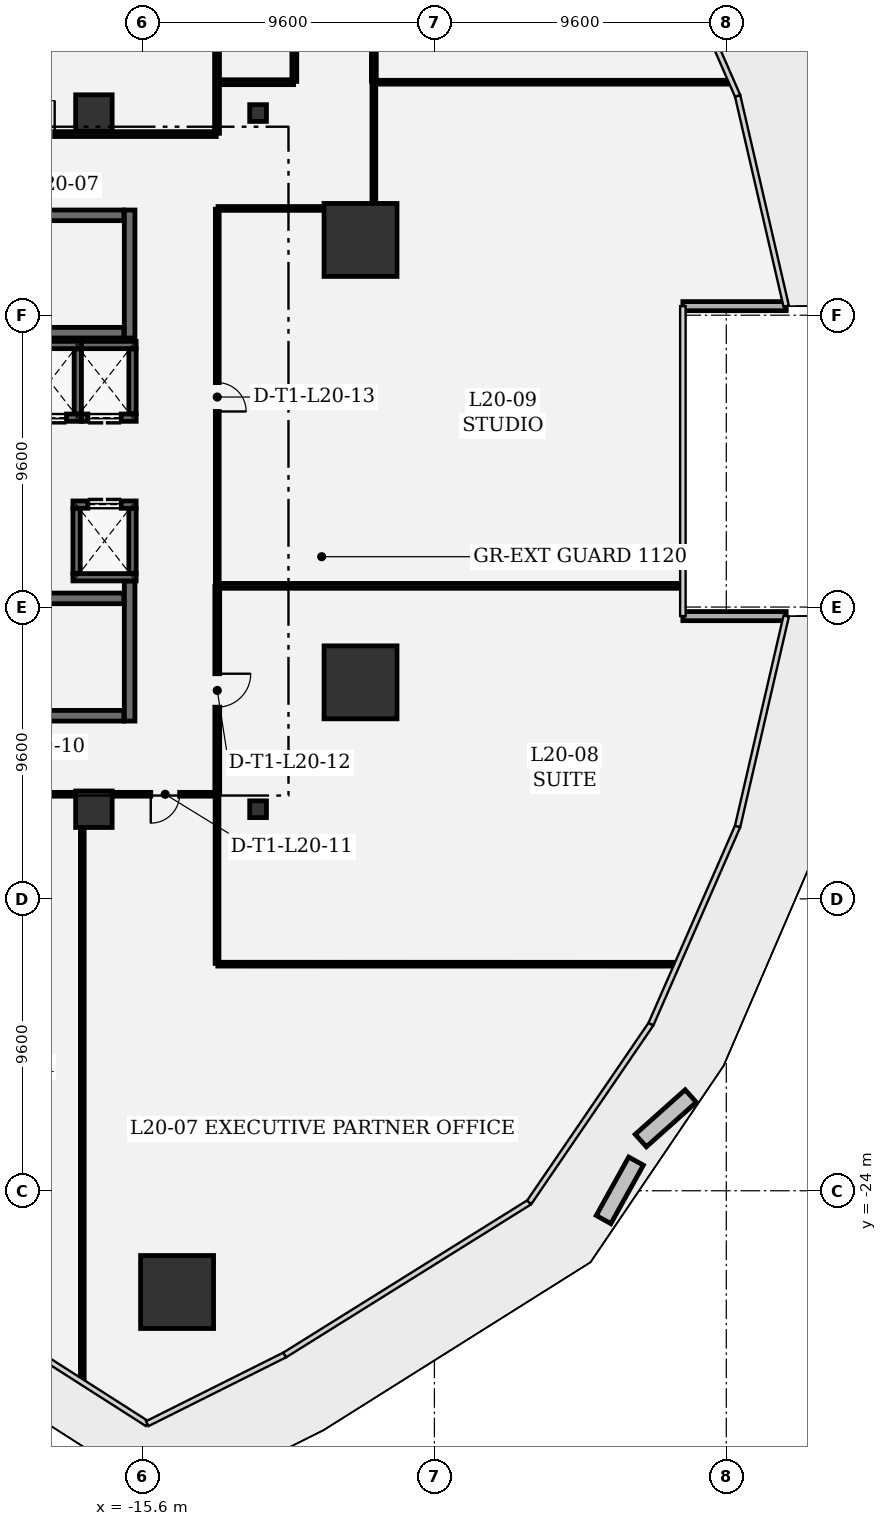
"""IFC4 building model, lengths in metres.
Left out: names, types, materials, properties, quantities, classifications, styles, units other than length and angle.
Written with IfcOpenShell. Run it as: python <this file> out.ifc"""

import sys

from ifc_helpers import new_model, si_unit, direction, frame, frame_2d, origin, origin_2d, place, context, subcontext, project, spatial, rectangle, extrude, element, fill, save


model = new_model("IFC4")
c1 = context("Model", 3, precision=1e-05, world=origin(), true_north=direction((0.0, 1.0)))
c2 = subcontext(c1, "Body", "Model", "MODEL_VIEW")
j1 = project(units=[si_unit("LENGTHUNIT", "METRE"), si_unit("PLANEANGLEUNIT", "RADIAN")], contexts=[c1])
p1 = place(None, origin())
s1 = spatial("IfcSite", under=j1, at=p1, CompositionType="ELEMENT")
p2 = place(p1, origin())
s2 = spatial("IfcBuilding", under=s1, at=p2, CompositionType="ELEMENT")
p3 = place(p2, frame((0.0, 0.0, 91.2)))
s3 = spatial("IfcBuildingStorey", under=s2, at=p3, CompositionType="ELEMENT", Elevation=91.2)
for number, where, z_axis, x_axis in (
    (1, (-14.464, -27.331, 0.0), (0.0, 0.0, 1.0), (1.0, 0.0, 0.0)),
    (2, (-8.43, -7.276, 0.0), (0.0, 0.0, 1.0), (1.0, 0.0, 0.0)),
    (3, (-8.43, 7.276, 0.0), (0.0, 0.0, 1.0), (1.0, 0.0, 0.0)),
):
    element("IfcColumn", number, at=place(p3, frame(where, z_axis=z_axis, x_axis=x_axis)), inside=s3, PredefinedType="COLUMN", context=c2, shape_type="SweptSolid", body=[
        extrude(rectangle(XDim=2.4, YDim=2.4, at=origin_2d()), origin(), (0.0, 0.0, 1.0), 4.2),
    ])
for number, where, z_axis, x_axis in (
    (4, (-17.2, 11.45, 0.0), (0.0, 0.0, 1.0), (1.0, 0.0, 0.0)),
    (5, (-17.2, -11.45, 0.0), (0.0, 0.0, 1.0), (1.0, 0.0, 0.0)),
):
    element("IfcColumn", number, at=place(p3, frame(where, z_axis=z_axis, x_axis=x_axis)), inside=s3, PredefinedType="COLUMN", context=c2, shape_type="SweptSolid", body=[
        extrude(rectangle(XDim=1.2, YDim=1.2, at=origin_2d()), origin(), (0.0, 0.0, 1.0), 4.2),
    ])
for number, where, z_axis, x_axis in (
    (6, (-11.8, -11.45, 0.0), (0.0, 0.0, 1.0), (1.0, 0.0, 0.0)),
    (7, (-11.8, 11.45, 0.0), (0.0, 0.0, 1.0), (1.0, 0.0, 0.0)),
):
    element("IfcColumn", number, at=place(p3, frame(where, z_axis=z_axis, x_axis=x_axis)), inside=s3, PredefinedType="COLUMN", context=c2, shape_type="SweptSolid", body=[
        extrude(rectangle(XDim=0.55, YDim=0.55, at=origin_2d()), origin(), (0.0, 0.0, 1.0), 4.2),
    ])
for number, where, z_axis, x_axis in (
    (8, (5.571, -5.098, 0.0), (0.0, 0.0, 1.0), (-1.0, 0.0, 0.0)),
    (9, (2.172, 5.098, 0.0), (0.0, 0.0, 1.0), (1.0, 0.0, 0.0)),
):
    element("IfcWall", number, at=place(p3, frame(where, z_axis=z_axis, x_axis=x_axis)), inside=s3, PredefinedType="SOLIDWALL", context=c2, shape_type="SweptSolid", body=[
        extrude(rectangle(XDim=3.398, YDim=0.3, at=frame_2d((1.699, 0.0))), origin(), (0.0, 0.0, 1.0), 3.92),
    ])
p4 = place(p3, frame((-16.025, 4.05, 0.0), z_axis=(0.0, 0.0, 1.0), x_axis=(0.0, 1.0, 0.0)))
e10 = element("IfcWall", 10, at=p4, inside=s3, PredefinedType="SHEAR", context=c2, shape_type="SweptSolid", body=[
    extrude(rectangle(XDim=4.21, YDim=0.35, at=frame_2d((2.105, 0.0))), origin(), (0.0, 0.0, 1.0), 3.92),
])
p5 = place(p3, frame((-24.335, 4.225, 0.0), z_axis=(0.0, 0.0, 1.0), x_axis=(1.0, 0.0, 0.0)))
e11 = element("IfcWall", 11, at=p5, inside=s3, PredefinedType="SHEAR", context=c2, shape_type="SweptSolid", body=[
    extrude(rectangle(XDim=8.12, YDim=0.35, at=frame_2d((4.06, 0.0))), origin(), (0.0, 0.0, 1.0), 3.92),
])
p6 = place(p3, frame((-16.215, 8.085, 0.0), z_axis=(0.0, 0.0, 1.0), x_axis=(-1.0, 0.0, 0.0)))
e12 = element("IfcWall", 12, at=p6, inside=s3, PredefinedType="SHEAR", context=c2, shape_type="SweptSolid", body=[
    extrude(rectangle(XDim=8.12, YDim=0.35, at=frame_2d((4.06, 0.0))), origin(), (0.0, 0.0, 1.0), 3.92),
])
p7 = place(p6, frame((6.74, 0.0, 0.0)))
e13 = element("IfcOpeningElement", 13, at=p7, cuts=e12, PredefinedType="OPENING", context=c2, shape_type="SweptSolid", body=[
    extrude(rectangle(XDim=1.1, YDim=2.2, at=frame_2d((0.55, 1.1))), frame((0.0, 0.185, 0.0), z_axis=(0.0, -1.0, 0.0), x_axis=(1.0, 0.0, 0.0)), (0.0, 0.0, 1.0), 0.37),
])
p8 = place(p3, frame((-16.025, -8.55, 0.0), z_axis=(0.0, 0.0, 1.0), x_axis=(0.0, 1.0, 0.0)))
e14 = element("IfcWall", 14, at=p8, inside=s3, PredefinedType="SHEAR", context=c2, shape_type="SweptSolid", body=[
    extrude(rectangle(XDim=4.61, YDim=0.35, at=frame_2d((2.305, 0.0))), origin(), (0.0, 0.0, 1.0), 3.92),
])
p9 = place(p3, frame((-24.335, -8.375, 0.0), z_axis=(0.0, 0.0, 1.0), x_axis=(1.0, 0.0, 0.0)))
e15 = element("IfcWall", 15, at=p9, inside=s3, PredefinedType="SHEAR", context=c2, shape_type="SweptSolid", body=[
    extrude(rectangle(XDim=8.12, YDim=0.35, at=frame_2d((4.06, 0.0))), origin(), (0.0, 0.0, 1.0), 3.92),
])
p10 = place(p9, frame((0.28, 0.0, 0.0)))
e16 = element("IfcOpeningElement", 16, at=p10, cuts=e15, PredefinedType="OPENING", context=c2, shape_type="SweptSolid", body=[
    extrude(rectangle(XDim=1.1, YDim=2.2, at=frame_2d((0.55, 1.1))), frame((0.0, 0.185, 0.0), z_axis=(0.0, -1.0, 0.0), x_axis=(1.0, 0.0, 0.0)), (0.0, 0.0, 1.0), 0.37),
])
p11 = place(p3, frame((-16.215, -4.515, 0.0), z_axis=(0.0, 0.0, 1.0), x_axis=(-1.0, 0.0, 0.0)))
e17 = element("IfcWall", 17, at=p11, inside=s3, PredefinedType="SHEAR", context=c2, shape_type="SweptSolid", body=[
    extrude(rectangle(XDim=8.12, YDim=0.35, at=frame_2d((4.06, 0.0))), origin(), (0.0, 0.0, 1.0), 3.92),
])
p12 = place(p3, frame((-17.61, 1.43, 0.0), z_axis=(0.0, 0.0, 1.0), x_axis=(-1.0, 0.0, 0.0)))
e18 = element("IfcWall", 18, at=p12, inside=s3, PredefinedType="SHEAR", context=c2, shape_type="SweptSolid", body=[
    extrude(rectangle(XDim=2.08, YDim=0.24, at=frame_2d((1.04, 0.0))), origin(), (0.0, 0.0, 1.0), 3.92),
])
p13 = place(p12, frame((0.49, 0.0, 0.0)))
e19 = element("IfcOpeningElement", 19, at=p13, cuts=e18, PredefinedType="OPENING", context=c2, shape_type="SweptSolid", body=[
    extrude(rectangle(XDim=1.1, YDim=2.2, at=frame_2d((0.55, 1.1))), frame((0.0, 0.13, 0.0), z_axis=(0.0, -1.0, 0.0), x_axis=(1.0, 0.0, 0.0)), (0.0, 0.0, 1.0), 0.26),
])
p14 = place(p3, frame((-19.69, 3.82, 0.0), z_axis=(0.0, 0.0, 1.0), x_axis=(1.0, 0.0, 0.0)))
e20 = element("IfcWall", 20, at=p14, inside=s3, PredefinedType="SHEAR", context=c2, shape_type="SweptSolid", body=[
    extrude(rectangle(XDim=2.08, YDim=0.24, at=frame_2d((1.04, 0.0))), origin(), (0.0, 0.0, 1.0), 3.92),
])
p15 = place(p3, frame((-17.73, 3.688, 0.0), z_axis=(0.0, 0.0, 1.0), x_axis=(0.0, -1.0, 0.0)))
e21 = element("IfcWall", 21, at=p15, inside=s3, PredefinedType="SHEAR", context=c2, shape_type="SweptSolid", body=[
    extrude(rectangle(XDim=2.126, YDim=0.24, at=frame_2d((1.063, 0.0))), origin(), (0.0, 0.0, 1.0), 3.92),
])
p16 = place(p3, frame((-15.81, 1.43, 0.0), z_axis=(0.0, 0.0, 1.0), x_axis=(-1.0, 0.0, 0.0)))
e22 = element("IfcWall", 22, at=p16, inside=s3, PredefinedType="SHEAR", context=c2, shape_type="SweptSolid", body=[
    extrude(rectangle(XDim=1.8, YDim=0.24, at=frame_2d((0.9, 0.0))), origin(), (0.0, 0.0, 1.0), 3.92),
])
p17 = place(p16, frame((0.49, 0.0, 0.0)))
e23 = element("IfcOpeningElement", 23, at=p17, cuts=e22, PredefinedType="OPENING", context=c2, shape_type="SweptSolid", body=[
    extrude(rectangle(XDim=1.1, YDim=2.2, at=frame_2d((0.55, 1.1))), frame((0.0, 0.13, 0.0), z_axis=(0.0, -1.0, 0.0), x_axis=(1.0, 0.0, 0.0)), (0.0, 0.0, 1.0), 0.26),
])
p18 = place(p3, frame((-17.61, 3.82, 0.0), z_axis=(0.0, 0.0, 1.0), x_axis=(1.0, 0.0, 0.0)))
e24 = element("IfcWall", 24, at=p18, inside=s3, PredefinedType="SHEAR", context=c2, shape_type="SweptSolid", body=[
    extrude(rectangle(XDim=1.8, YDim=0.24, at=frame_2d((0.9, 0.0))), origin(), (0.0, 0.0, 1.0), 3.92),
])
p19 = place(p3, frame((-15.93, 3.688, 0.0), z_axis=(0.0, 0.0, 1.0), x_axis=(0.0, -1.0, 0.0)))
e25 = element("IfcWall", 25, at=p19, inside=s3, PredefinedType="SHEAR", context=c2, shape_type="SweptSolid", body=[
    extrude(rectangle(XDim=2.126, YDim=0.24, at=frame_2d((1.063, 0.0))), origin(), (0.0, 0.0, 1.0), 3.92),
])
p20 = place(p3, frame((-15.81, -3.82, 0.0), z_axis=(0.0, 0.0, 1.0), x_axis=(-1.0, 0.0, 0.0)))
e26 = element("IfcWall", 26, at=p20, inside=s3, PredefinedType="SHEAR", context=c2, shape_type="SweptSolid", body=[
    extrude(rectangle(XDim=2.08, YDim=0.24, at=frame_2d((1.04, 0.0))), origin(), (0.0, 0.0, 1.0), 3.92),
])
p21 = place(p3, frame((-17.89, -1.43, 0.0), z_axis=(0.0, 0.0, 1.0), x_axis=(1.0, 0.0, 0.0)))
e27 = element("IfcWall", 27, at=p21, inside=s3, PredefinedType="SHEAR", context=c2, shape_type="SweptSolid", body=[
    extrude(rectangle(XDim=2.08, YDim=0.24, at=frame_2d((1.04, 0.0))), origin(), (0.0, 0.0, 1.0), 3.92),
])
p22 = place(p21, frame((0.49, 0.0, 0.0)))
e28 = element("IfcOpeningElement", 28, at=p22, cuts=e27, PredefinedType="OPENING", context=c2, shape_type="SweptSolid", body=[
    extrude(rectangle(XDim=1.1, YDim=2.2, at=frame_2d((0.55, 1.1))), frame((0.0, 0.13, 0.0), z_axis=(0.0, -1.0, 0.0), x_axis=(1.0, 0.0, 0.0)), (0.0, 0.0, 1.0), 0.26),
])
for number, where, z_axis, x_axis in (
    (29, (-17.77, -3.688, 0.0), (0.0, 0.0, 1.0), (0.0, 1.0, 0.0)),
    (30, (-15.93, -1.562, 0.0), (0.0, 0.0, 1.0), (0.0, -1.0, 0.0)),
):
    element("IfcWall", number, at=place(p3, frame(where, z_axis=z_axis, x_axis=x_axis)), inside=s3, PredefinedType="SHEAR", context=c2, shape_type="SweptSolid", body=[
        extrude(rectangle(XDim=2.126, YDim=0.24, at=frame_2d((1.063, 0.0))), origin(), (0.0, 0.0, 1.0), 3.92),
    ])
p23 = place(p3, frame((-21.717, 10.758, 0.0), z_axis=(0.0, 0.0, 1.0), x_axis=(1.0, 0.0, 0.0)))
e31 = element("IfcWall", 31, at=p23, inside=s3, PredefinedType="PARTITIONING", context=c2, shape_type="SweptSolid", body=[
    extrude(rectangle(XDim=8.542, YDim=0.16, at=frame_2d((4.271, 0.0))), origin(), (0.0, 0.0, 1.0), 2.957),
])
p24 = place(p23, frame((2.126, 0.0, 0.0)))
e32 = element("IfcOpeningElement", 32, at=p24, cuts=e31, PredefinedType="OPENING", context=c2, shape_type="SweptSolid", body=[
    extrude(rectangle(XDim=1.1, YDim=2.15, at=frame_2d((0.55, 1.075))), frame((0.0, 0.09, 0.0), z_axis=(0.0, -1.0, 0.0), x_axis=(1.0, 0.0, 0.0)), (0.0, 0.0, 1.0), 0.18),
])
p25 = place(p3, frame((-13.15, 10.783, 0.0), z_axis=(0.0, 0.0, 1.0), x_axis=(0.0, 1.0, 0.0)))
e33 = element("IfcWall", 33, at=p25, inside=s3, PredefinedType="PARTITIONING", context=c2, shape_type="SweptSolid", body=[
    extrude(rectangle(XDim=19.651, YDim=0.16, at=frame_2d((9.826, 0.0))), origin(), (0.0, 0.0, 1.0), 2.89),
])
p26 = place(p3, frame((-17.865, -10.958, 0.0), z_axis=(0.0, 0.0, 1.0), x_axis=(-1.0, 0.0, 0.0)))
e34 = element("IfcWall", 34, at=p26, inside=s3, PredefinedType="PARTITIONING", context=c2, shape_type="SweptSolid", body=[
    extrude(rectangle(XDim=4.543, YDim=0.125, at=frame_2d((2.271, 0.0))), origin(), (0.0, 0.0, 1.0), 3.92),
])
p27 = place(p26, frame((1.797, 0.0, 0.0)))
e35 = element("IfcOpeningElement", 35, at=p27, cuts=e34, PredefinedType="OPENING", context=c2, shape_type="SweptSolid", body=[
    extrude(rectangle(XDim=0.95, YDim=2.15, at=frame_2d((0.475, 1.075))), frame((0.0, 0.073, 0.0), z_axis=(0.0, -1.0, 0.0), x_axis=(1.0, 0.0, 0.0)), (0.0, 0.0, 1.0), 0.145),
])
p28 = place(p3, frame((-17.582, -30.217, 0.0), z_axis=(0.0, 0.0, 1.0), x_axis=(0.0, 1.0, 0.0)))
e36 = element("IfcWall", 36, at=p28, inside=s3, PredefinedType="PARTITIONING", context=c2, shape_type="SweptSolid", body=[
    extrude(rectangle(XDim=18.102, YDim=0.125, at=frame_2d((9.051, 0.0))), origin(), (0.0, 0.0, 1.0), 2.957),
])
p29 = place(p3, frame((1.906, -16.549, 0.0), z_axis=(0.0, 0.0, 1.0), x_axis=(-0.999999993536, 0.000113697272, 0.0)))
e37 = element("IfcWall", 37, at=p29, inside=s3, PredefinedType="PARTITIONING", context=c2, shape_type="SweptSolid", body=[
    extrude(rectangle(XDim=15.031, YDim=0.125, at=frame_2d((7.516, 0.0))), origin(), (0.0, 0.0, 1.0), 3.92),
])
p30 = place(p3, frame((-13.15, -10.983, 0.0), z_axis=(0.0, 0.0, 1.0), x_axis=(0.0, -1.0, 0.0)))
e38 = element("IfcWall", 38, at=p30, inside=s3, PredefinedType="PARTITIONING", context=c2, shape_type="SweptSolid", body=[
    extrude(rectangle(XDim=5.539, YDim=0.125, at=frame_2d((2.77, 0.0))), origin(), (0.0, 0.0, 1.0), 3.92),
])
p31 = place(p3, frame((-13.175, -10.958, 0.0), z_axis=(0.0, 0.0, 1.0), x_axis=(-1.0, 0.0, 0.0)))
e39 = element("IfcWall", 39, at=p31, inside=s3, PredefinedType="PARTITIONING", context=c2, shape_type="SweptSolid", body=[
    extrude(rectangle(XDim=3.36, YDim=0.125, at=frame_2d((1.68, 0.0))), origin(), (0.0, 0.0, 1.0), 2.957),
])
p32 = place(p31, frame((1.205, 0.0, 0.0)))
e40 = element("IfcOpeningElement", 40, at=p32, cuts=e39, PredefinedType="OPENING", context=c2, shape_type="SweptSolid", body=[
    extrude(rectangle(XDim=0.95, YDim=2.15, at=frame_2d((0.475, 1.075))), frame((0.0, 0.073, 0.0), z_axis=(0.0, -1.0, 0.0), x_axis=(1.0, 0.0, 0.0)), (0.0, 0.0, 1.0), 0.145),
])
p33 = place(p3, frame((2.092, -4.103, 0.0), z_axis=(0.0, 0.0, 1.0), x_axis=(-1.0, 0.0, 0.0)))
e41 = element("IfcWall", 41, at=p33, inside=s3, PredefinedType="PARTITIONING", context=c2, shape_type="SweptSolid", body=[
    extrude(rectangle(XDim=15.209, YDim=0.16, at=frame_2d((7.605, 0.0))), origin(), (0.0, 0.0, 1.0), 3.92),
])
p34 = place(p3, frame((-13.142, -4.128, 0.0), z_axis=(0.0, 0.0, 1.0), x_axis=(0.0, -1.0, 0.0)))
e42 = element("IfcWall", 42, at=p34, inside=s3, PredefinedType="PARTITIONING", context=c2, shape_type="SweptSolid", body=[
    extrude(rectangle(XDim=6.83, YDim=0.16, at=frame_2d((3.415, 0.0))), origin(), (0.0, 0.0, 1.0), 3.92),
])
p35 = place(p34, frame((2.865, 0.0, 0.0)))
e43 = element("IfcOpeningElement", 43, at=p35, cuts=e42, PredefinedType="OPENING", context=c2, shape_type="SweptSolid", body=[
    extrude(rectangle(XDim=1.1, YDim=2.15, at=frame_2d((0.55, 1.075))), frame((0.0, 0.09, 0.0), z_axis=(0.0, -1.0, 0.0), x_axis=(1.0, 0.0, 0.0)), (0.0, 0.0, 1.0), 0.18),
])
p36 = place(p3, frame((3.696, 12.464, 0.0), z_axis=(0.0, 0.0, 1.0), x_axis=(-1.0, 0.0, 0.0)))
e44 = element("IfcWall", 44, at=p36, inside=s3, PredefinedType="PARTITIONING", context=c2, shape_type="SweptSolid", body=[
    extrude(rectangle(XDim=11.663, YDim=0.125, at=frame_2d((5.832, 0.0))), origin(), (0.0, 0.0, 1.0), 3.92),
])
p37 = place(p3, frame((-7.992, 12.439, 0.0), z_axis=(0.0, 0.0, 1.0), x_axis=(0.0, -1.0, 0.0)))
e45 = element("IfcWall", 45, at=p37, inside=s3, PredefinedType="PARTITIONING", context=c2, shape_type="SweptSolid", body=[
    extrude(rectangle(XDim=3.898, YDim=0.125, at=frame_2d((1.949, 0.0))), origin(), (0.0, 0.0, 1.0), 3.92),
])
p38 = place(p3, frame((-9.695, 8.312, 0.0), z_axis=(0.0, 0.0, 1.0), x_axis=(-1.0, 0.0, 0.0)))
e46 = element("IfcWall", 46, at=p38, inside=s3, PredefinedType="PARTITIONING", context=c2, shape_type="SweptSolid", body=[
    extrude(rectangle(XDim=3.422, YDim=0.125, at=frame_2d((1.711, 0.0))), origin(), (0.0, 0.0, 1.0), 2.957),
])
p39 = place(p3, frame((-13.142, 8.287, 0.0), z_axis=(0.0, 0.0, 1.0), x_axis=(0.0, -1.0, 0.0)))
e47 = element("IfcWall", 47, at=p39, inside=s3, PredefinedType="PARTITIONING", context=c2, shape_type="SweptSolid", body=[
    extrude(rectangle(XDim=12.357, YDim=0.125, at=frame_2d((6.179, 0.0))), origin(), (0.0, 0.0, 1.0), 3.92),
])
p40 = place(p39, frame((5.704, 0.0, 0.0)))
e48 = element("IfcOpeningElement", 48, at=p40, cuts=e47, PredefinedType="OPENING", context=c2, shape_type="SweptSolid", body=[
    extrude(rectangle(XDim=0.95, YDim=2.15, at=frame_2d((0.475, 1.075))), frame((0.0, 0.073, 0.0), z_axis=(0.0, -1.0, 0.0), x_axis=(1.0, 0.0, 0.0)), (0.0, 0.0, 1.0), 0.145),
])
p41 = place(p3, frame((-13.04, 12.464, 0.0), z_axis=(0.0, 0.0, 1.0), x_axis=(1.0, 0.0, 0.0)))
e49 = element("IfcWall", 49, at=p41, inside=s3, PredefinedType="PARTITIONING", context=c2, shape_type="SweptSolid", body=[
    extrude(rectangle(XDim=2.407, YDim=0.16, at=frame_2d((1.204, 0.0))), origin(), (0.0, 0.0, 1.0), 3.92),
])
p42 = place(p3, frame((-10.608, 27.067, 0.0), z_axis=(0.0, 0.0, 1.0), x_axis=(0.0, -1.0, 0.0)))
e50 = element("IfcWall", 50, at=p42, inside=s3, PredefinedType="PARTITIONING", context=c2, shape_type="SweptSolid", body=[
    extrude(rectangle(XDim=14.578, YDim=0.16, at=frame_2d((7.289, 0.0))), origin(), (0.0, 0.0, 1.0), 2.89),
])
p43 = place(p42, frame((6.739, 0.0, 0.0)))
e51 = element("IfcOpeningElement", 51, at=p43, cuts=e50, PredefinedType="OPENING", context=c2, shape_type="SweptSolid", body=[
    extrude(rectangle(XDim=1.1, YDim=2.15, at=frame_2d((0.55, 1.075))), frame((0.0, 0.09, 0.0), z_axis=(0.0, -1.0, 0.0), x_axis=(1.0, 0.0, 0.0)), (0.0, 0.0, 1.0), 0.18),
])
p44 = place(p3, frame((-7.992, 25.433, 0.0), z_axis=(0.0, 0.0, 1.0), x_axis=(0.0, -1.0, 0.0)))
e52 = element("IfcWall", 52, at=p44, inside=s3, PredefinedType="PARTITIONING", context=c2, shape_type="SweptSolid", body=[
    extrude(rectangle(XDim=12.936, YDim=0.16, at=frame_2d((6.468, 0.0))), origin(), (0.0, 0.0, 1.0), 3.92),
])
p45 = place(p13, origin())
e53 = element("IfcDoor", 53, at=p45, inside=s3, OperationType="DOUBLE_DOOR_SLIDING", PredefinedType="DOOR", context=c2, shape_type="SweptSolid", body=[
    extrude(rectangle(XDim=1.1, YDim=2.2, at=frame_2d((0.55, 1.1))), frame((0.0, 0.025, 0.0), z_axis=(0.0, -1.0, 0.0), x_axis=(1.0, 0.0, 0.0)), (0.0, 0.0, 1.0), 0.05),
])
fill(e19, e53)
p46 = place(p17, origin())
e54 = element("IfcDoor", 54, at=p46, inside=s3, OperationType="DOUBLE_DOOR_SLIDING", PredefinedType="DOOR", context=c2, shape_type="SweptSolid", body=[
    extrude(rectangle(XDim=1.1, YDim=2.2, at=frame_2d((0.55, 1.1))), frame((0.0, 0.025, 0.0), z_axis=(0.0, -1.0, 0.0), x_axis=(1.0, 0.0, 0.0)), (0.0, 0.0, 1.0), 0.05),
])
fill(e23, e54)
p47 = place(p22, origin())
e55 = element("IfcDoor", 55, at=p47, inside=s3, OperationType="DOUBLE_DOOR_SLIDING", PredefinedType="DOOR", context=c2, shape_type="SweptSolid", body=[
    extrude(rectangle(XDim=1.1, YDim=2.2, at=frame_2d((0.55, 1.1))), frame((0.0, 0.025, 0.0), z_axis=(0.0, -1.0, 0.0), x_axis=(1.0, 0.0, 0.0)), (0.0, 0.0, 1.0), 0.05),
])
fill(e28, e55)
p48 = place(p24, origin())
e56 = element("IfcDoor", 56, at=p48, inside=s3, OperationType="SINGLE_SWING_RIGHT", PredefinedType="DOOR", context=c2, shape_type="SweptSolid", body=[
    extrude(rectangle(XDim=1.1, YDim=2.15, at=frame_2d((0.55, 1.075))), frame((0.0, 0.025, 0.0), z_axis=(0.0, -1.0, 0.0), x_axis=(1.0, 0.0, 0.0)), (0.0, 0.0, 1.0), 0.05),
])
fill(e32, e56)
p49 = place(p32, origin())
e57 = element("IfcDoor", 57, at=p49, inside=s3, OperationType="SINGLE_SWING_RIGHT", PredefinedType="DOOR", context=c2, shape_type="SweptSolid", body=[
    extrude(rectangle(XDim=0.95, YDim=2.15, at=frame_2d((0.475, 1.075))), frame((0.0, 0.025, 0.0), z_axis=(0.0, -1.0, 0.0), x_axis=(1.0, 0.0, 0.0)), (0.0, 0.0, 1.0), 0.05),
])
fill(e40, e57)
p50 = place(p35, origin())
e58 = element("IfcDoor", 58, at=p50, inside=s3, OperationType="SINGLE_SWING_LEFT", PredefinedType="DOOR", context=c2, shape_type="SweptSolid", body=[
    extrude(rectangle(XDim=1.1, YDim=2.15, at=frame_2d((0.55, 1.075))), frame((0.0, 0.025, 0.0), z_axis=(0.0, -1.0, 0.0), x_axis=(1.0, 0.0, 0.0)), (0.0, 0.0, 1.0), 0.05),
])
fill(e43, e58)
p51 = place(p40, origin())
e59 = element("IfcDoor", 59, at=p51, inside=s3, OperationType="SINGLE_SWING_RIGHT", PredefinedType="DOOR", context=c2, shape_type="SweptSolid", body=[
    extrude(rectangle(XDim=0.95, YDim=2.15, at=frame_2d((0.475, 1.075))), frame((0.0, 0.025, 0.0), z_axis=(0.0, -1.0, 0.0), x_axis=(1.0, 0.0, 0.0)), (0.0, 0.0, 1.0), 0.05),
])
fill(e48, e59)
save(model, sys.argv[1])
